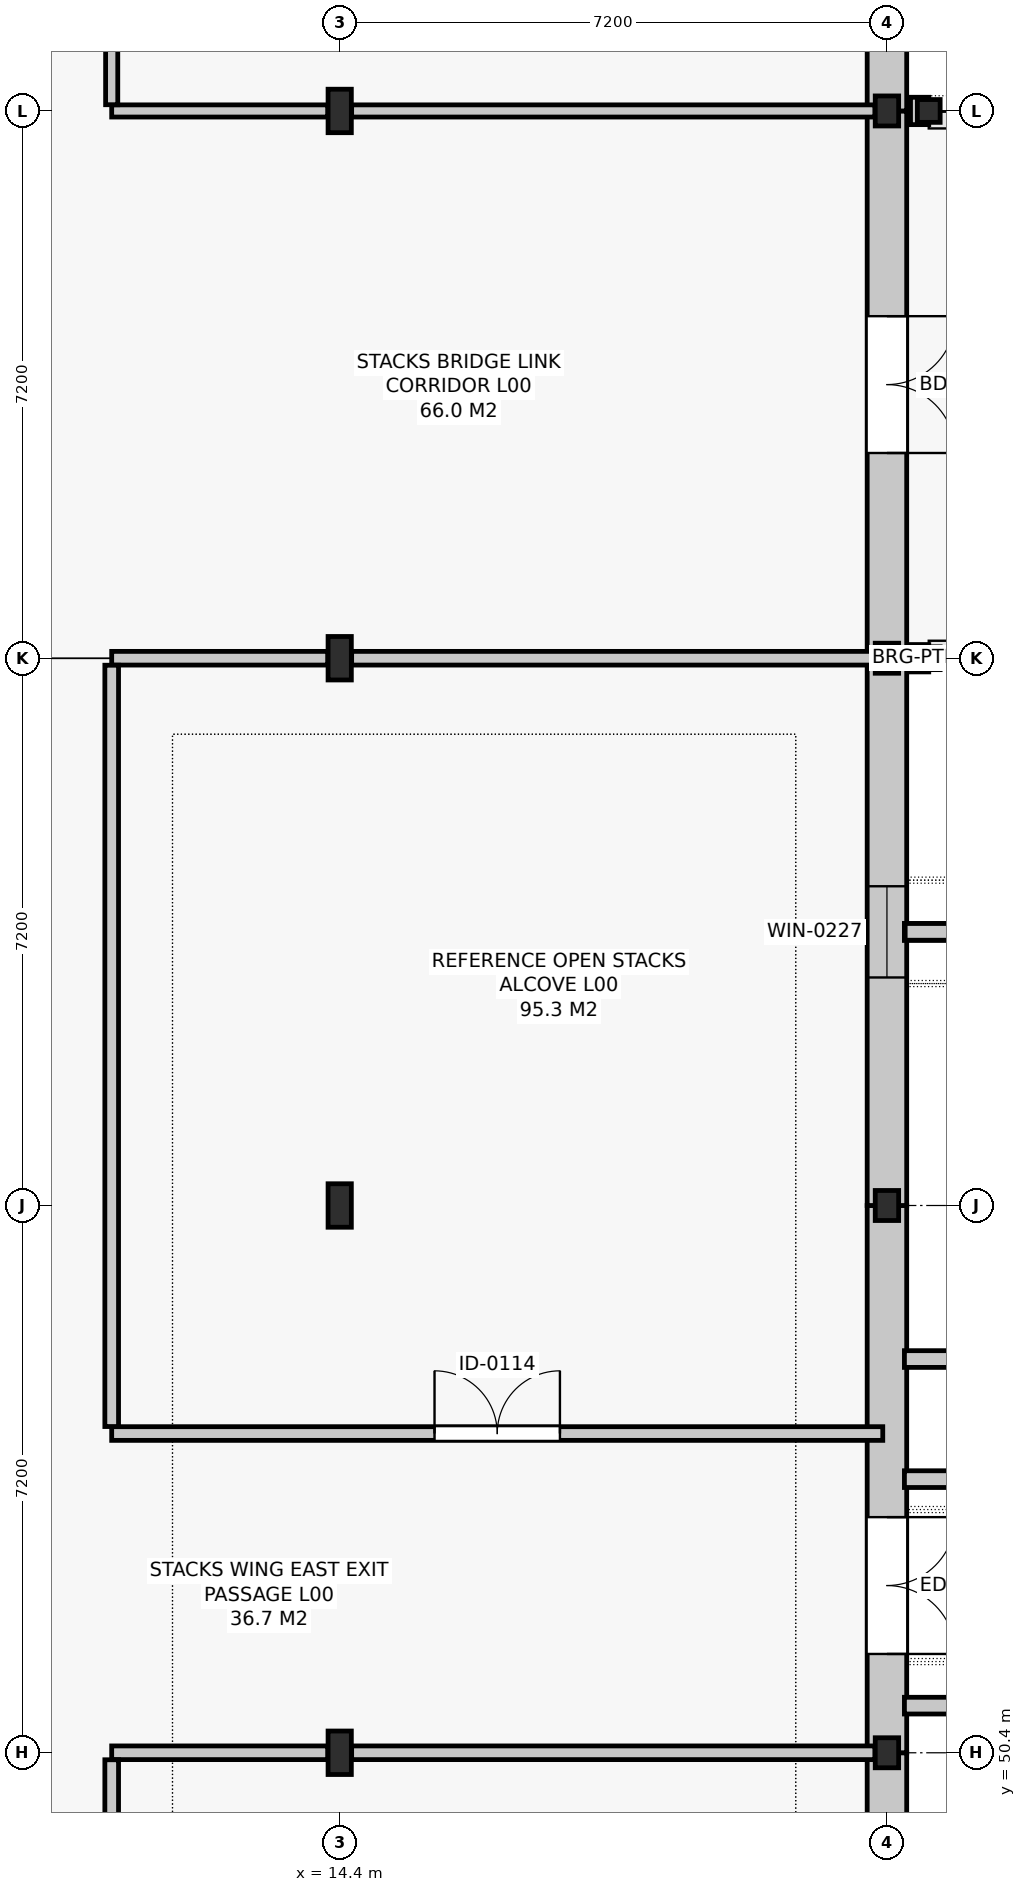
"""IFC4 building model, lengths in metres.
Left out: names, types, materials, properties, quantities, classifications, styles, units other than length and angle.
Written with IfcOpenShell. Run it as: python <this file> out.ifc"""

import sys

from ifc_helpers import new_model, si_unit, direction, frame, frame_2d, origin, origin_2d, place, context, subcontext, project, spatial, rectangle, i_section, extrude, element, fill, save


model = new_model("IFC4")
c1 = context("Model", 3, precision=1e-05, world=origin(), true_north=direction((0.0, 1.0)))
c2 = subcontext(c1, "Body", "Model", "MODEL_VIEW")
j1 = project(units=[si_unit("LENGTHUNIT", "METRE"), si_unit("PLANEANGLEUNIT", "RADIAN")], contexts=[c1])
p1 = place(None, origin())
s1 = spatial("IfcSite", under=j1, at=p1, CompositionType="ELEMENT")
p2 = place(p1, origin())
s2 = spatial("IfcBuilding", under=s1, at=p2, CompositionType="ELEMENT")
p3 = place(p2, origin())
s3 = spatial("IfcBuildingStorey", under=s2, at=p3, CompositionType="ELEMENT", Elevation=0.0)
for number, where, z_axis, x_axis in (
    (1, (14.4, 50.4, 0.0), (0.0, 0.0, 1.0), (1.0, 0.0, 0.0)),
    (2, (14.4, 57.6, 0.0), (0.0, 0.0, 1.0), (1.0, 0.0, 0.0)),
    (3, (14.4, 64.8, 0.0), (0.0, 0.0, 1.0), (1.0, 0.0, 0.0)),
    (4, (14.4, 72.0, 0.0), (0.0, 0.0, 1.0), (1.0, 0.0, 0.0)),
):
    element("IfcColumn", number, at=place(p3, frame(where, z_axis=z_axis, x_axis=x_axis)), inside=s3, PredefinedType="COLUMN", context=c2, shape_type="SweptSolid", body=[
        extrude(i_section(OverallWidth=0.306, OverallDepth=0.572, WebThickness=0.021, FlangeThickness=0.04, FilletRadius=0.027, at=origin_2d()), origin(), (0.0, 0.0, 1.0), 5.4),
    ])
for number, where, z_axis, x_axis in (
    (5, (21.6, 50.4, 0.0), (0.0, 0.0, 1.0), (1.0, 0.0, 0.0)),
    (6, (21.6, 57.6, 0.0), (0.0, 0.0, 1.0), (1.0, 0.0, 0.0)),
    (7, (21.6, 64.8, 0.0), (0.0, 0.0, 1.0), (1.0, 0.0, 0.0)),
    (8, (21.6, 72.0, 0.0), (0.0, 0.0, 1.0), (1.0, 0.0, 0.0)),
):
    element("IfcColumn", number, at=place(p3, frame(where, z_axis=z_axis, x_axis=x_axis)), inside=s3, PredefinedType="COLUMN", context=c2, shape_type="SweptSolid", body=[
        extrude(i_section(OverallWidth=0.308, OverallDepth=0.395, WebThickness=0.021, FlangeThickness=0.036, FilletRadius=0.027, at=origin_2d()), origin(), (0.0, 0.0, 1.0), 5.4),
    ])
for number, where, z_axis, x_axis in (
    (9, (22.15, 64.8, 0.0), (0.0, 0.0, 1.0), (1.0, 0.0, 0.0)),
    (10, (22.15, 72.0, 0.0), (0.0, 0.0, 1.0), (1.0, 0.0, 0.0)),
):
    element("IfcColumn", number, at=place(p3, frame(where, z_axis=z_axis, x_axis=x_axis)), inside=s3, PredefinedType="COLUMN", context=c2, shape_type="SweptSolid", body=[
        extrude(i_section(OverallWidth=0.3, OverallDepth=0.3, WebThickness=0.011, FlangeThickness=0.019, FilletRadius=0.027, at=origin_2d()), origin(), (0.0, 0.0, 1.0), 5.4),
    ])
p4 = place(p3, frame((21.6, 43.2, 0.0), z_axis=(0.0, 0.0, 1.0), x_axis=(0.0, 1.0, 0.0)))
e11 = element("IfcWall", 11, at=p4, inside=s3, PredefinedType="SOLIDWALL", context=c2, shape_type="SweptSolid", body=[
    extrude(rectangle(XDim=7.2, YDim=0.52, at=frame_2d((3.6, 0.0))), origin(), (0.0, 0.0, 1.0), 4.38),
])
p5 = place(p4, frame((3.0, 0.0, 0.95)))
e12 = element("IfcOpeningElement", 12, at=p5, cuts=e11, PredefinedType="OPENING", context=c2, shape_type="SweptSolid", body=[
    extrude(rectangle(XDim=1.2, YDim=2.15, at=frame_2d((0.6, 1.075))), frame((0.0, 0.272, 0.0), z_axis=(0.0, -1.0, 0.0), x_axis=(1.0, 0.0, 0.0)), (0.0, 0.0, 1.0), 0.544),
])
p6 = place(p3, frame((21.6, 50.4, 0.0), z_axis=(0.0, 0.0, 1.0), x_axis=(0.0, 1.0, 0.0)))
e13 = element("IfcWall", 13, at=p6, inside=s3, PredefinedType="SOLIDWALL", context=c2, shape_type="SweptSolid", body=[
    extrude(rectangle(XDim=7.2, YDim=0.52, at=frame_2d((3.6, 0.0))), origin(), (0.0, 0.0, 1.0), 4.38),
])
p7 = place(p6, frame((1.3, 0.0, 0.0)))
e14 = element("IfcOpeningElement", 14, at=p7, cuts=e13, PredefinedType="OPENING", context=c2, shape_type="SweptSolid", body=[
    extrude(rectangle(XDim=1.8, YDim=2.2, at=frame_2d((0.9, 1.1))), frame((0.0, 0.272, 0.0), z_axis=(0.0, -1.0, 0.0), x_axis=(1.0, 0.0, 0.0)), (0.0, 0.0, 1.0), 0.544),
])
p8 = place(p3, frame((21.6, 57.6, 0.0), z_axis=(0.0, 0.0, 1.0), x_axis=(0.0, 1.0, 0.0)))
e15 = element("IfcWall", 15, at=p8, inside=s3, PredefinedType="SOLIDWALL", context=c2, shape_type="SweptSolid", body=[
    extrude(rectangle(XDim=7.2, YDim=0.52, at=frame_2d((3.6, 0.0))), origin(), (0.0, 0.0, 1.0), 4.38),
])
p9 = place(p8, frame((3.0, 0.0, 0.95)))
e16 = element("IfcOpeningElement", 16, at=p9, cuts=e15, PredefinedType="OPENING", context=c2, shape_type="SweptSolid", body=[
    extrude(rectangle(XDim=1.2, YDim=2.15, at=frame_2d((0.6, 1.075))), frame((0.0, 0.272, 0.0), z_axis=(0.0, -1.0, 0.0), x_axis=(1.0, 0.0, 0.0)), (0.0, 0.0, 1.0), 0.544),
])
p10 = place(p3, frame((21.6, 64.8, 0.0), z_axis=(0.0, 0.0, 1.0), x_axis=(0.0, 1.0, 0.0)))
e17 = element("IfcWall", 17, at=p10, inside=s3, PredefinedType="SOLIDWALL", context=c2, shape_type="SweptSolid", body=[
    extrude(rectangle(XDim=7.2, YDim=0.52, at=frame_2d((3.6, 0.0))), origin(), (0.0, 0.0, 1.0), 4.38),
])
p11 = place(p10, frame((2.7, 0.0, 0.0)))
e18 = element("IfcOpeningElement", 18, at=p11, cuts=e17, PredefinedType="OPENING", context=c2, shape_type="SweptSolid", body=[
    extrude(rectangle(XDim=1.8, YDim=2.3, at=frame_2d((0.9, 1.15))), frame((0.0, 0.272, 0.0), z_axis=(0.0, -1.0, 0.0), x_axis=(1.0, 0.0, 0.0)), (0.0, 0.0, 1.0), 0.544),
])
p12 = place(p3, frame((21.6, 72.0, 0.0), z_axis=(0.0, 0.0, 1.0), x_axis=(0.0, 1.0, 0.0)))
e19 = element("IfcWall", 19, at=p12, inside=s3, PredefinedType="SOLIDWALL", context=c2, shape_type="SweptSolid", body=[
    extrude(rectangle(XDim=7.2, YDim=0.52, at=frame_2d((3.6, 0.0))), origin(), (0.0, 0.0, 1.0), 4.38),
])
p13 = place(p12, frame((3.0, 0.0, 0.95)))
e20 = element("IfcOpeningElement", 20, at=p13, cuts=e19, PredefinedType="OPENING", context=c2, shape_type="SweptSolid", body=[
    extrude(rectangle(XDim=1.2, YDim=2.15, at=frame_2d((0.6, 1.075))), frame((0.0, 0.272, 0.0), z_axis=(0.0, -1.0, 0.0), x_axis=(1.0, 0.0, 0.0)), (0.0, 0.0, 1.0), 0.544),
])
p14 = place(p3, frame((11.4, 72.0, 0.0), z_axis=(0.0, 0.0, 1.0), x_axis=(1.0, 0.0, 0.0)))
e21 = element("IfcWall", 21, at=p14, inside=s3, PredefinedType="PARTITIONING", context=c2, shape_type="SweptSolid", body=[
    extrude(rectangle(XDim=2.843, YDim=0.16, at=frame_2d((1.421, 0.0))), origin(), (0.0, 0.0, 1.0), 4.485),
])
p15 = place(p3, frame((14.557, 72.0, 0.0), z_axis=(0.0, 0.0, 1.0), x_axis=(1.0, 0.0, 0.0)))
e22 = element("IfcWall", 22, at=p15, inside=s3, PredefinedType="PARTITIONING", context=c2, shape_type="SweptSolid", body=[
    extrude(rectangle(XDim=6.885, YDim=0.16, at=frame_2d((3.442, 0.0))), origin(), (0.0, 0.0, 1.0), 4.485),
])
p16 = place(p3, frame((11.4, 50.4, 0.0), z_axis=(0.0, 0.0, 1.0), x_axis=(1.0, 0.0, 0.0)))
e23 = element("IfcWall", 23, at=p16, inside=s3, PredefinedType="PARTITIONING", context=c2, shape_type="SweptSolid", body=[
    extrude(rectangle(XDim=2.843, YDim=0.18, at=frame_2d((1.421, 0.0))), origin(), (0.0, 0.0, 1.0), 4.485),
])
p17 = place(p3, frame((14.557, 50.4, 0.0), z_axis=(0.0, 0.0, 1.0), x_axis=(1.0, 0.0, 0.0)))
e24 = element("IfcWall", 24, at=p17, inside=s3, PredefinedType="PARTITIONING", context=c2, shape_type="SweptSolid", body=[
    extrude(rectangle(XDim=6.885, YDim=0.18, at=frame_2d((3.442, 0.0))), origin(), (0.0, 0.0, 1.0), 4.485),
])
p18 = place(p3, frame((11.4, 54.6, 0.0), z_axis=(0.0, 0.0, 1.0), x_axis=(1.0, 0.0, 0.0)))
e25 = element("IfcWall", 25, at=p18, inside=s3, PredefinedType="PARTITIONING", context=c2, shape_type="SweptSolid", body=[
    extrude(rectangle(XDim=10.145, YDim=0.18, at=frame_2d((5.073, 0.0))), origin(), (0.0, 0.0, 1.0), 4.485),
])
p19 = place(p18, frame((4.248, 0.0, 0.0)))
e26 = element("IfcOpeningElement", 26, at=p19, cuts=e25, PredefinedType="OPENING", context=c2, shape_type="SweptSolid", body=[
    extrude(rectangle(XDim=1.65, YDim=2.25, at=frame_2d((0.825, 1.125))), frame((0.0, 0.102, 0.0), z_axis=(0.0, -1.0, 0.0), x_axis=(1.0, 0.0, 0.0)), (0.0, 0.0, 1.0), 0.204),
])
p20 = place(p3, frame((11.4, 64.8, 0.0), z_axis=(0.0, 0.0, 1.0), x_axis=(1.0, 0.0, 0.0)))
e27 = element("IfcWall", 27, at=p20, inside=s3, PredefinedType="PARTITIONING", context=c2, shape_type="SweptSolid", body=[
    extrude(rectangle(XDim=2.843, YDim=0.18, at=frame_2d((1.421, 0.0))), origin(), (0.0, 0.0, 1.0), 4.485),
])
p21 = place(p3, frame((14.557, 64.8, 0.0), z_axis=(0.0, 0.0, 1.0), x_axis=(1.0, 0.0, 0.0)))
e28 = element("IfcWall", 28, at=p21, inside=s3, PredefinedType="PARTITIONING", context=c2, shape_type="SweptSolid", body=[
    extrude(rectangle(XDim=6.885, YDim=0.18, at=frame_2d((3.442, 0.0))), origin(), (0.0, 0.0, 1.0), 4.485),
])
p22 = place(p3, frame((11.4, 72.082, 0.0), z_axis=(0.0, 0.0, 1.0), x_axis=(0.0, 1.0, 0.0)))
e29 = element("IfcWall", 29, at=p22, inside=s3, PredefinedType="PARTITIONING", context=c2, shape_type="SweptSolid", body=[
    extrude(rectangle(XDim=24.236, YDim=0.16, at=frame_2d((12.118, 0.0))), origin(), (0.0, 0.0, 1.0), 4.485),
])
p23 = place(p22, frame((11.618, 0.0, 0.0)))
e30 = element("IfcOpeningElement", 30, at=p23, cuts=e29, PredefinedType="OPENING", context=c2, shape_type="SweptSolid", body=[
    extrude(rectangle(XDim=1.0, YDim=2.15, at=frame_2d((0.5, 1.075))), frame((0.0, 0.092, 0.0), z_axis=(0.0, -1.0, 0.0), x_axis=(1.0, 0.0, 0.0)), (0.0, 0.0, 1.0), 0.184),
])
p24 = place(p3, frame((11.4, 28.855, 0.0), z_axis=(0.0, 0.0, 1.0), x_axis=(0.0, 1.0, 0.0)))
e31 = element("IfcWall", 31, at=p24, inside=s3, PredefinedType="PARTITIONING", context=c2, shape_type="SweptSolid", body=[
    extrude(rectangle(XDim=21.453, YDim=0.18, at=frame_2d((10.727, 0.0))), origin(), (0.0, 0.0, 1.0), 4.485),
])
p25 = place(p24, frame((9.902, 0.0, 0.0)))
e32 = element("IfcOpeningElement", 32, at=p25, cuts=e31, PredefinedType="OPENING", context=c2, shape_type="SweptSolid", body=[
    extrude(rectangle(XDim=1.65, YDim=2.25, at=frame_2d((0.825, 1.125))), frame((0.0, 0.102, 0.0), z_axis=(0.0, -1.0, 0.0), x_axis=(1.0, 0.0, 0.0)), (0.0, 0.0, 1.0), 0.204),
])
p26 = place(p3, frame((11.4, 54.692, 0.0), z_axis=(0.0, 0.0, 1.0), x_axis=(0.0, 1.0, 0.0)))
e33 = element("IfcWall", 33, at=p26, inside=s3, PredefinedType="PARTITIONING", context=c2, shape_type="SweptSolid", body=[
    extrude(rectangle(XDim=10.016, YDim=0.18, at=frame_2d((5.008, 0.0))), origin(), (0.0, 0.0, 1.0), 4.485),
])
p27 = place(p7, frame((1.8, 0.0, 0.0), z_axis=(0.0, 0.0, 1.0), x_axis=(-1.0, 0.0, 0.0)))
e34 = element("IfcDoor", 34, at=p27, inside=s3, OperationType="DOUBLE_DOOR_SINGLE_SWING", PredefinedType="DOOR", context=c2, shape_type="SweptSolid", body=[
    extrude(rectangle(XDim=1.8, YDim=2.2, at=frame_2d((0.9, 1.1))), frame((0.0, 0.025, 0.0), z_axis=(0.0, -1.0, 0.0), x_axis=(1.0, 0.0, 0.0)), (0.0, 0.0, 1.0), 0.05),
])
fill(e14, e34)
p28 = place(p9, origin())
e35 = element("IfcWindow", 35, at=p28, inside=s3, PartitioningType="SINGLE_PANEL", PredefinedType="WINDOW", context=c2, shape_type="SweptSolid", body=[
    extrude(rectangle(XDim=1.2, YDim=2.15, at=frame_2d((0.6, 1.075))), frame((0.0, 0.03, 0.0), z_axis=(0.0, -1.0, 0.0), x_axis=(1.0, 0.0, 0.0)), (0.0, 0.0, 1.0), 0.06),
])
fill(e16, e35)
p29 = place(p11, frame((1.8, 0.0, 0.0), z_axis=(0.0, 0.0, 1.0), x_axis=(-1.0, 0.0, 0.0)))
e36 = element("IfcDoor", 36, at=p29, inside=s3, OperationType="DOUBLE_DOOR_SINGLE_SWING", PredefinedType="DOOR", context=c2, shape_type="SweptSolid", body=[
    extrude(rectangle(XDim=1.8, YDim=2.3, at=frame_2d((0.9, 1.15))), frame((0.0, 0.025, 0.0), z_axis=(0.0, -1.0, 0.0), x_axis=(1.0, 0.0, 0.0)), (0.0, 0.0, 1.0), 0.05),
])
fill(e18, e36)
p30 = place(p19, origin())
e37 = element("IfcDoor", 37, at=p30, inside=s3, OperationType="DOUBLE_DOOR_SINGLE_SWING", PredefinedType="DOOR", context=c2, shape_type="SweptSolid", body=[
    extrude(rectangle(XDim=1.65, YDim=2.25, at=frame_2d((0.825, 1.125))), frame((0.0, 0.025, 0.0), z_axis=(0.0, -1.0, 0.0), x_axis=(1.0, 0.0, 0.0)), (0.0, 0.0, 1.0), 0.05),
])
fill(e26, e37)
save(model, sys.argv[1])
